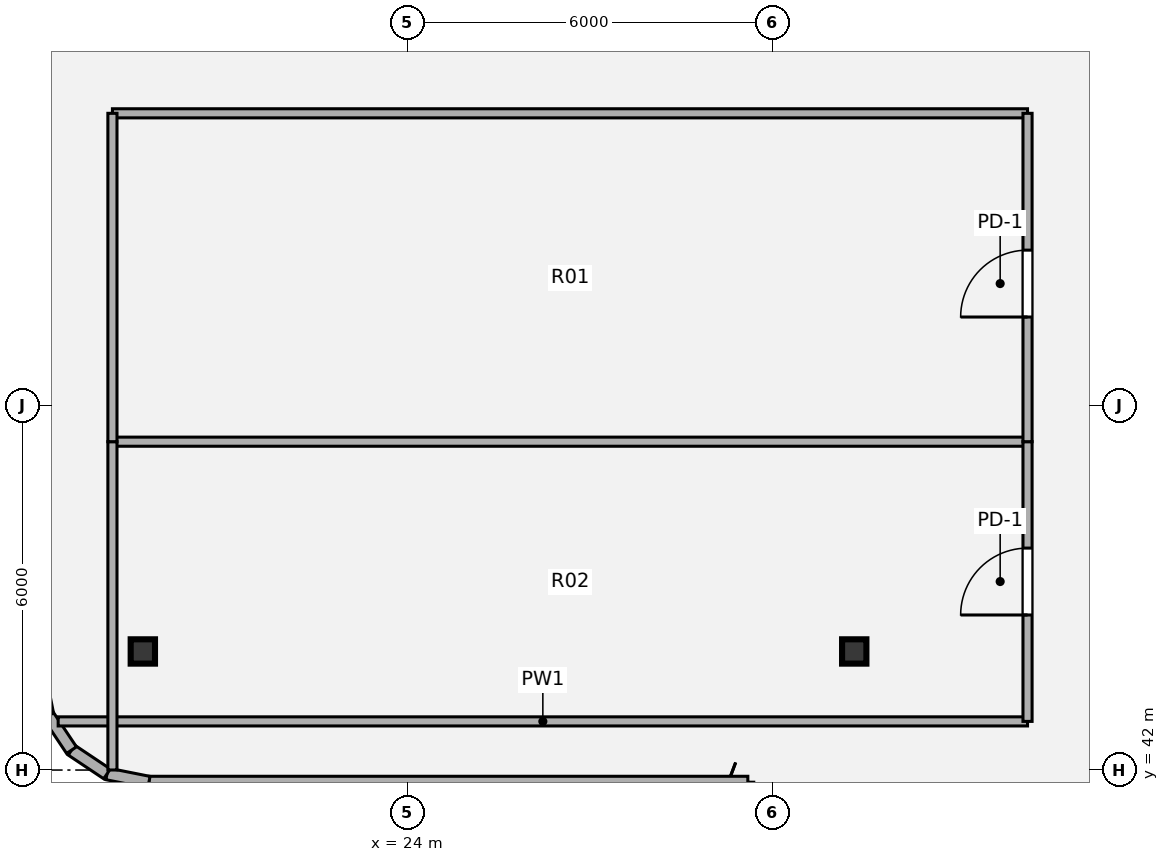
"""IFC4 building model, lengths in metres.
Left out: names, types, materials, properties, quantities, classifications, styles, units other than length and angle.
Written with IfcOpenShell. Run it as: python <this file> out.ifc"""

import sys

from ifc_helpers import new_model, si_unit, direction, frame, frame_2d, origin, origin_2d, place, context, subcontext, project, spatial, rectangle, hollow_rectangle, extrude, source, transform, mapped, element, fill, save


model = new_model("IFC4")
c1 = context("Model", 3, precision=1e-05, world=origin(), true_north=direction((0.0, 1.0)))
c2 = subcontext(c1, "Body", "Model", "MODEL_VIEW")
j1 = project(units=[si_unit("LENGTHUNIT", "METRE"), si_unit("PLANEANGLEUNIT", "RADIAN")], contexts=[c1])
p1 = place(None, origin())
s1 = spatial("IfcSite", under=j1, at=p1, CompositionType="ELEMENT")
p2 = place(p1, origin())
s2 = spatial("IfcBuilding", under=s1, at=p2, CompositionType="ELEMENT")
p3 = place(p2, frame((0.0, 0.0, 307.8)))
s3 = spatial("IfcBuildingStorey", under=s2, at=p3, CompositionType="ELEMENT", Elevation=307.8)
m1 = source(origin(), c2, "Body", "SweptSolid", [
    extrude(hollow_rectangle(XDim=0.4, YDim=0.4, WallThickness=0.02, OuterFilletRadius=0.04, at=origin_2d()), origin(), (0.0, 0.0, 1.0), 3.96),
])
for number, where, z_axis, x_axis in (
    (1, (19.65, 43.95, 0.0), (0.0, 0.0, 1.0), (1.0, 0.0, 0.0)),
    (2, (31.35, 43.95, 0.0), (0.0, 0.0, 1.0), (1.0, 0.0, 0.0)),
):
    element("IfcColumn", number, at=place(p3, frame(where, z_axis=z_axis, x_axis=x_axis)), inside=s3, PredefinedType="COLUMN", context=c2, shape_type="MappedRepresentation", body=[
        mapped(m1, transform((0.0, 0.0, 0.0), x_axis=(1.0, 0.0, 0.0), y_axis=(0.0, 1.0, 0.0), z_axis=(0.0, 0.0, 1.0), scale=1.0)),
    ])
p4 = place(p3, frame((29.6, 21.4, 0.0), z_axis=(0.0, 0.0, 1.0), x_axis=(0.0, 1.0, 0.0)))
e3 = element("IfcWall", 3, at=p4, inside=s3, PredefinedType="SOLIDWALL", context=c2, shape_type="SweptSolid", body=[
    extrude(rectangle(XDim=20.4, YDim=0.195, at=frame_2d((10.2, 0.0))), origin(), (0.0, 0.0, 1.0), 2.998),
])
p5 = place(p3, frame((29.6, 41.8, 0.0), z_axis=(0.0, 0.0, 1.0), x_axis=(-1.0, 0.0, 0.0)))
e4 = element("IfcWall", 4, at=p5, inside=s3, PredefinedType="SOLIDWALL", context=c2, shape_type="SweptSolid", body=[
    extrude(rectangle(XDim=9.85, YDim=0.195, at=frame_2d((4.925, 0.0))), origin(), (0.0, 0.0, 1.0), 3.71),
])
p6 = place(p3, frame((19.75, 41.8, 0.0), z_axis=(0.0, 0.0, 1.0), x_axis=(-0.980794046625, 0.195046246068, 0.0)))
e5 = element("IfcWall", 5, at=p6, inside=s3, PredefinedType="SOLIDWALL", context=c2, shape_type="SweptSolid", body=[
    extrude(rectangle(XDim=0.702, YDim=0.195, at=frame_2d((0.351, 0.0))), origin(), (0.0, 0.0, 1.0), 3.71),
])
for number, where, z_axis, x_axis in (
    (6, (19.061, 41.937, 0.0), (0.0, 0.0, 1.0), (-0.832, 0.556, 0.0)),
    (7, (18.477, 42.327, 0.0), (0.0, 0.0, 1.0), (-0.556, 0.831, 0.0)),
    (8, (18.087, 42.911, 0.0), (0.0, 0.0, 1.0), (-0.195, 0.981, 0.0)),
):
    element("IfcWall", number, at=place(p3, frame(where, z_axis=z_axis, x_axis=x_axis)), inside=s3, PredefinedType="SOLIDWALL", context=c2, shape_type="SweptSolid", body=[
        extrude(rectangle(XDim=0.702, YDim=0.195, at=frame_2d((0.351, 0.0))), origin(), (0.0, 0.0, 1.0), 3.71),
    ])
p7 = place(p3, frame((18.258, 42.8, 0.0), z_axis=(0.0, 0.0, 1.0), x_axis=(1.0, 0.0, 0.0)))
e9 = element("IfcWall", 9, at=p7, inside=s3, PredefinedType="PARTITIONING", context=c2, shape_type="SweptSolid", body=[
    extrude(rectangle(XDim=15.942, YDim=0.15, at=frame_2d((7.971, 0.0))), origin(), (0.0, 0.0, 1.0), 3.68),
])
for number, where, z_axis, x_axis in (
    (10, (19.15, 47.4, 0.0), (0.0, 0.0, 1.0), (1.0, 0.0, 0.0)),
    (11, (19.15, 52.8, 0.0), (0.0, 0.0, 1.0), (1.0, 0.0, 0.0)),
):
    element("IfcWall", number, at=place(p3, frame(where, z_axis=z_axis, x_axis=x_axis)), inside=s3, PredefinedType="PARTITIONING", context=c2, shape_type="SweptSolid", body=[
        extrude(rectangle(XDim=15.05, YDim=0.15, at=frame_2d((7.525, 0.0))), origin(), (0.0, 0.0, 1.0), 3.162),
    ])
p8 = place(p3, frame((19.15, 42.001, 0.0), z_axis=(0.0, 0.0, 1.0), x_axis=(0.0, 1.0, 0.0)))
e12 = element("IfcWall", 12, at=p8, inside=s3, PredefinedType="PARTITIONING", context=c2, shape_type="SweptSolid", body=[
    extrude(rectangle(XDim=5.399, YDim=0.15, at=frame_2d((2.699, 0.0))), origin(), (0.0, 0.0, 1.0), 3.68),
])
p9 = place(p3, frame((19.15, 47.4, 0.0), z_axis=(0.0, 0.0, 1.0), x_axis=(0.0, 1.0, 0.0)))
e13 = element("IfcWall", 13, at=p9, inside=s3, PredefinedType="PARTITIONING", context=c2, shape_type="SweptSolid", body=[
    extrude(rectangle(XDim=5.4, YDim=0.15, at=frame_2d((2.7, 0.0))), origin(), (0.0, 0.0, 1.0), 3.68),
])
p10 = place(p3, frame((34.2, 42.8, 0.0), z_axis=(0.0, 0.0, 1.0), x_axis=(0.0, 1.0, 0.0)))
e14 = element("IfcWall", 14, at=p10, inside=s3, PredefinedType="PARTITIONING", context=c2, shape_type="SweptSolid", body=[
    extrude(rectangle(XDim=4.6, YDim=0.15, at=frame_2d((2.3, 0.0))), origin(), (0.0, 0.0, 1.0), 3.68),
])
p11 = place(p10, frame((1.75, 0.0, 0.0)))
e15 = element("IfcOpeningElement", 15, at=p11, cuts=e14, PredefinedType="OPENING", context=c2, shape_type="SweptSolid", body=[
    extrude(rectangle(XDim=1.1, YDim=2.1, at=origin_2d()), frame((0.55, 0.085, 1.05), z_axis=(0.0, -1.0, 0.0), x_axis=(1.0, 0.0, 0.0)), (0.0, 0.0, 1.0), 0.17),
])
p12 = place(p3, frame((34.2, 47.4, 0.0), z_axis=(0.0, 0.0, 1.0), x_axis=(0.0, 1.0, 0.0)))
e16 = element("IfcWall", 16, at=p12, inside=s3, PredefinedType="PARTITIONING", context=c2, shape_type="SweptSolid", body=[
    extrude(rectangle(XDim=5.4, YDim=0.15, at=frame_2d((2.7, 0.0))), origin(), (0.0, 0.0, 1.0), 3.68),
])
p13 = place(p12, frame((2.05, 0.0, 0.0)))
e17 = element("IfcOpeningElement", 17, at=p13, cuts=e16, PredefinedType="OPENING", context=c2, shape_type="SweptSolid", body=[
    extrude(rectangle(XDim=1.1, YDim=2.1, at=origin_2d()), frame((0.55, 0.085, 1.05), z_axis=(0.0, -1.0, 0.0), x_axis=(1.0, 0.0, 0.0)), (0.0, 0.0, 1.0), 0.17),
])
m2 = source(origin(), c2, "Body", "SweptSolid", [
    extrude(rectangle(XDim=1.1, YDim=2.1, at=origin_2d()), frame((0.55, 0.025, 1.05), z_axis=(0.0, -1.0, 0.0), x_axis=(1.0, 0.0, 0.0)), (0.0, 0.0, 1.0), 0.05),
])
p14 = place(p11, origin())
e18 = element("IfcDoor", 18, at=p14, inside=s3, OperationType="SINGLE_SWING_LEFT", PredefinedType="DOOR", context=c2, shape_type="MappedRepresentation", body=[
    mapped(m2, transform((0.0, 0.0, 0.0), x_axis=(1.0, 0.0, 0.0), y_axis=(0.0, 1.0, 0.0), z_axis=(0.0, 0.0, 1.0), scale=1.0)),
])
fill(e15, e18)
p15 = place(p13, origin())
e19 = element("IfcDoor", 19, at=p15, inside=s3, OperationType="SINGLE_SWING_LEFT", PredefinedType="DOOR", context=c2, shape_type="MappedRepresentation", body=[
    mapped(m2, transform((0.0, 0.0, 0.0), x_axis=(1.0, 0.0, 0.0), y_axis=(0.0, 1.0, 0.0), z_axis=(0.0, 0.0, 1.0), scale=1.0)),
])
fill(e17, e19)
save(model, sys.argv[1])
